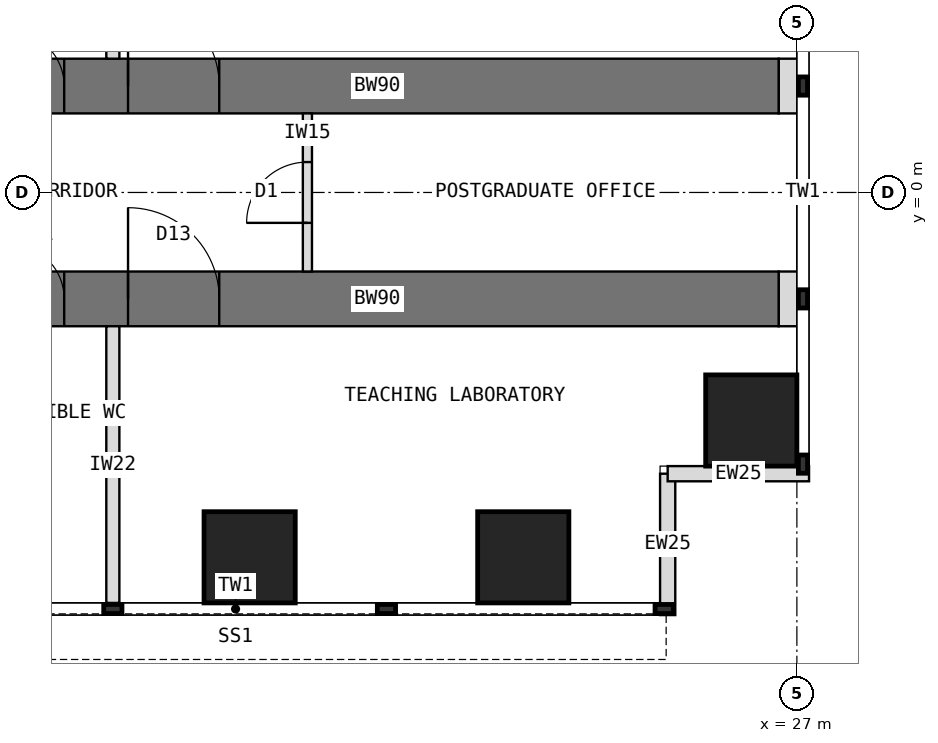
"""IFC4 building model, lengths in metres.
Left out: names, types, materials, properties, quantities, classifications, styles, units other than length and angle.
Written with IfcOpenShell. Run it as: python <this file> out.ifc"""

import sys

from ifc_helpers import new_model, si_unit, direction, frame, frame_2d, origin, origin_2d, place, context, subcontext, project, spatial, rectangle, extrude, element, fill, save


model = new_model("IFC4")
c1 = context("Model", 3, precision=1e-05, world=origin(), true_north=direction((0.0, 1.0)))
c2 = subcontext(c1, "Body", "Model", "MODEL_VIEW")
j1 = project(units=[si_unit("LENGTHUNIT", "METRE"), si_unit("PLANEANGLEUNIT", "RADIAN")], contexts=[c1])
p1 = place(None, origin())
s1 = spatial("IfcSite", under=j1, at=p1, CompositionType="ELEMENT")
p2 = place(p1, origin())
s2 = spatial("IfcBuilding", under=s1, at=p2, CompositionType="ELEMENT")
p3 = place(p2, frame((0.0, 0.0, 24.5)))
s3 = spatial("IfcBuildingStorey", under=s2, at=p3, CompositionType="ELEMENT", Elevation=24.5)
p4 = place(p3, frame((13.5, 1.75, 0.0), z_axis=(0.0, 0.0, 1.0), x_axis=(1.0, 0.0, 0.0)))
e1 = element("IfcWall", 1, at=p4, inside=s3, PredefinedType="SHEAR", context=c2, shape_type="SweptSolid", body=[
    extrude(rectangle(XDim=13.2, YDim=0.9, at=frame_2d((6.6, 0.0))), origin(), (0.0, 0.0, 1.0), 4.0),
])
p5 = place(p4, frame((0.55, 0.0, 0.0)))
e2 = element("IfcOpeningElement", 2, at=p5, cuts=e1, PredefinedType="OPENING", context=c2, shape_type="SweptSolid", body=[
    extrude(rectangle(XDim=0.9, YDim=2.1, at=frame_2d((0.45, 1.05))), frame((0.0, 0.46, 0.0), z_axis=(0.0, -1.0, 0.0), x_axis=(1.0, 0.0, 0.0)), (0.0, 0.0, 1.0), 0.92),
])
p6 = place(p4, frame((2.5, 0.0, 0.0)))
e3 = element("IfcOpeningElement", 3, at=p6, cuts=e1, PredefinedType="OPENING", context=c2, shape_type="SweptSolid", body=[
    extrude(rectangle(XDim=1.5, YDim=2.1, at=frame_2d((0.75, 1.05))), frame((0.0, 0.46, 0.0), z_axis=(0.0, -1.0, 0.0), x_axis=(1.0, 0.0, 0.0)), (0.0, 0.0, 1.0), 0.92),
])
p7 = place(p3, frame((13.5, -1.75, 0.0), z_axis=(0.0, 0.0, 1.0), x_axis=(1.0, 0.0, 0.0)))
e4 = element("IfcWall", 4, at=p7, inside=s3, PredefinedType="SHEAR", context=c2, shape_type="SweptSolid", body=[
    extrude(rectangle(XDim=13.2, YDim=0.9, at=frame_2d((6.6, 0.0))), origin(), (0.0, 0.0, 1.0), 4.0),
])
p8 = place(p7, frame((0.55, 0.0, 0.0)))
e5 = element("IfcOpeningElement", 5, at=p8, cuts=e4, PredefinedType="OPENING", context=c2, shape_type="SweptSolid", body=[
    extrude(rectangle(XDim=0.9, YDim=2.1, at=frame_2d((0.45, 1.05))), frame((0.0, 0.46, 0.0), z_axis=(0.0, -1.0, 0.0), x_axis=(1.0, 0.0, 0.0)), (0.0, 0.0, 1.0), 0.92),
])
p9 = place(p7, frame((2.5, 0.0, 0.0)))
e6 = element("IfcOpeningElement", 6, at=p9, cuts=e4, PredefinedType="OPENING", context=c2, shape_type="SweptSolid", body=[
    extrude(rectangle(XDim=1.5, YDim=2.1, at=frame_2d((0.75, 1.05))), frame((0.0, 0.46, 0.0), z_axis=(0.0, -1.0, 0.0), x_axis=(1.0, 0.0, 0.0)), (0.0, 0.0, 1.0), 0.92),
])
for number, where, z_axis, x_axis in (
    (7, (18.0, -6.0, 0.0), (0.0, 0.0, 1.0), (1.0, 0.0, 0.0)),
    (8, (22.5, -6.0, 0.0), (0.0, 0.0, 1.0), (1.0, 0.0, 0.0)),
    (9, (26.25, -3.75, 0.0), (0.0, 0.0, 1.0), (1.0, 0.0, 0.0)),
):
    element("IfcColumn", number, at=place(p3, frame(where, z_axis=z_axis, x_axis=x_axis)), inside=s3, PredefinedType="COLUMN", context=c2, shape_type="SweptSolid", body=[
        extrude(rectangle(XDim=1.5, YDim=1.5, at=origin_2d()), origin(), (0.0, 0.0, 1.0), 4.0),
    ])
for number, where, z_axis, x_axis in (
    (10, (24.875, -6.95, 0.0), (0.0, 0.0, 1.0), (0.0, 1.0, 0.0)),
    (11, (24.875, -4.625, 0.0), (0.0, 0.0, 1.0), (1.0, 0.0, 0.0)),
):
    element("IfcWall", number, at=place(p3, frame(where, z_axis=z_axis, x_axis=x_axis)), inside=s3, PredefinedType="STANDARD", context=c2, shape_type="SweptSolid", body=[
        extrude(rectangle(XDim=2.325, YDim=0.25, at=frame_2d((1.163, 0.0))), origin(), (0.0, 0.0, 1.0), 3.8),
    ])
for number, where, z_axis, x_axis in (
    (12, (26.7, 1.75, 0.0), (0.0, 0.0, 1.0), (1.0, 0.0, 0.0)),
    (13, (26.7, -1.75, 0.0), (0.0, 0.0, 1.0), (1.0, 0.0, 0.0)),
):
    element("IfcWall", number, at=place(p3, frame(where, z_axis=z_axis, x_axis=x_axis)), inside=s3, PredefinedType="PARTITIONING", context=c2, shape_type="SweptSolid", body=[
        extrude(rectangle(XDim=0.31, YDim=0.9, at=frame_2d((0.155, 0.0))), origin(), (0.0, 0.0, 1.0), 3.8),
    ])
for number, where, z_axis, x_axis in (
    (14, (15.75, 2.2, 0.0), (0.0, 0.0, 1.0), (0.0, 1.0, 0.0)),
    (15, (15.75, -2.2, 0.0), (0.0, 0.0, 1.0), (0.0, -1.0, 0.0)),
):
    element("IfcWall", number, at=place(p3, frame(where, z_axis=z_axis, x_axis=x_axis)), inside=s3, PredefinedType="PARTITIONING", context=c2, shape_type="SweptSolid", body=[
        extrude(rectangle(XDim=4.55, YDim=0.215, at=frame_2d((2.275, 0.0))), origin(), (0.0, 0.0, 1.0), 3.8),
    ])
p10 = place(p3, frame((18.95, -1.3, 0.0), z_axis=(0.0, 0.0, 1.0), x_axis=(0.0, 1.0, 0.0)))
e16 = element("IfcWall", 16, at=p10, inside=s3, PredefinedType="PARTITIONING", context=c2, shape_type="SweptSolid", body=[
    extrude(rectangle(XDim=2.6, YDim=0.15, at=frame_2d((1.3, 0.0))), origin(), (0.0, 0.0, 1.0), 3.8),
])
p11 = place(p10, frame((0.8, 0.0, 0.0)))
e17 = element("IfcOpeningElement", 17, at=p11, cuts=e16, PredefinedType="OPENING", context=c2, shape_type="SweptSolid", body=[
    extrude(rectangle(XDim=1.0, YDim=2.1, at=frame_2d((0.5, 1.05))), frame((0.0, 0.085, 0.0), z_axis=(0.0, -1.0, 0.0), x_axis=(1.0, 0.0, 0.0)), (0.0, 0.0, 1.0), 0.17),
])
p12 = place(p11, origin())
e18 = element("IfcDoor", 18, at=p12, inside=s3, OperationType="SINGLE_SWING_LEFT", PredefinedType="DOOR", context=c2, shape_type="SweptSolid", body=[
    extrude(rectangle(XDim=1.0, YDim=2.1, at=frame_2d((0.5, 1.05))), frame((0.0, 0.025, 0.0), z_axis=(0.0, -1.0, 0.0), x_axis=(1.0, 0.0, 0.0)), (0.0, 0.0, 1.0), 0.05),
])
fill(e17, e18)
p13 = place(p5, origin())
e19 = element("IfcDoor", 19, at=p13, inside=s3, OperationType="SINGLE_SWING_LEFT", PredefinedType="DOOR", context=c2, shape_type="SweptSolid", body=[
    extrude(rectangle(XDim=0.82, YDim=2.06, at=frame_2d((0.45, 1.03))), frame((0.0, 0.025, 0.0), z_axis=(0.0, -1.0, 0.0), x_axis=(1.0, 0.0, 0.0)), (0.0, 0.0, 1.0), 0.05),
    extrude(rectangle(XDim=0.04, YDim=2.1, at=frame_2d((0.02, 1.05))), frame((0.0, 0.45, 0.0), z_axis=(0.0, -1.0, 0.0), x_axis=(1.0, 0.0, 0.0)), (0.0, 0.0, 1.0), 0.899),
    extrude(rectangle(XDim=0.04, YDim=2.1, at=frame_2d((0.88, 1.05))), frame((0.0, 0.45, 0.0), z_axis=(0.0, -1.0, 0.0), x_axis=(1.0, 0.0, 0.0)), (0.0, 0.0, 1.0), 0.899),
    extrude(rectangle(XDim=0.82, YDim=0.04, at=frame_2d((0.45, 2.08))), frame((0.0, 0.45, 0.0), z_axis=(0.0, -1.0, 0.0), x_axis=(1.0, 0.0, 0.0)), (0.0, 0.0, 1.0), 0.899),
])
fill(e2, e19)
p14 = place(p6, origin())
e20 = element("IfcDoor", 20, at=p14, inside=s3, OperationType="DOUBLE_DOOR_SINGLE_SWING", PredefinedType="DOOR", context=c2, shape_type="SweptSolid", body=[
    extrude(rectangle(XDim=1.42, YDim=2.06, at=frame_2d((0.75, 1.03))), frame((0.0, 0.025, 0.0), z_axis=(0.0, -1.0, 0.0), x_axis=(1.0, 0.0, 0.0)), (0.0, 0.0, 1.0), 0.05),
    extrude(rectangle(XDim=0.04, YDim=2.1, at=frame_2d((0.02, 1.05))), frame((0.0, 0.45, 0.0), z_axis=(0.0, -1.0, 0.0), x_axis=(1.0, 0.0, 0.0)), (0.0, 0.0, 1.0), 0.899),
    extrude(rectangle(XDim=0.04, YDim=2.1, at=frame_2d((1.48, 1.05))), frame((0.0, 0.45, 0.0), z_axis=(0.0, -1.0, 0.0), x_axis=(1.0, 0.0, 0.0)), (0.0, 0.0, 1.0), 0.899),
    extrude(rectangle(XDim=1.42, YDim=0.04, at=frame_2d((0.75, 2.08))), frame((0.0, 0.45, 0.0), z_axis=(0.0, -1.0, 0.0), x_axis=(1.0, 0.0, 0.0)), (0.0, 0.0, 1.0), 0.899),
])
fill(e3, e20)
p15 = place(p8, origin())
e21 = element("IfcDoor", 21, at=p15, inside=s3, OperationType="SINGLE_SWING_LEFT", PredefinedType="DOOR", context=c2, shape_type="SweptSolid", body=[
    extrude(rectangle(XDim=0.82, YDim=2.06, at=frame_2d((0.45, 1.03))), frame((0.0, 0.025, 0.0), z_axis=(0.0, -1.0, 0.0), x_axis=(1.0, 0.0, 0.0)), (0.0, 0.0, 1.0), 0.05),
    extrude(rectangle(XDim=0.04, YDim=2.1, at=frame_2d((0.02, 1.05))), frame((0.0, 0.45, 0.0), z_axis=(0.0, -1.0, 0.0), x_axis=(1.0, 0.0, 0.0)), (0.0, 0.0, 1.0), 0.899),
    extrude(rectangle(XDim=0.04, YDim=2.1, at=frame_2d((0.88, 1.05))), frame((0.0, 0.45, 0.0), z_axis=(0.0, -1.0, 0.0), x_axis=(1.0, 0.0, 0.0)), (0.0, 0.0, 1.0), 0.899),
    extrude(rectangle(XDim=0.82, YDim=0.04, at=frame_2d((0.45, 2.08))), frame((0.0, 0.45, 0.0), z_axis=(0.0, -1.0, 0.0), x_axis=(1.0, 0.0, 0.0)), (0.0, 0.0, 1.0), 0.899),
])
fill(e5, e21)
p16 = place(p9, origin())
e22 = element("IfcDoor", 22, at=p16, inside=s3, OperationType="DOUBLE_DOOR_SINGLE_SWING", PredefinedType="DOOR", context=c2, shape_type="SweptSolid", body=[
    extrude(rectangle(XDim=1.42, YDim=2.06, at=frame_2d((0.75, 1.03))), frame((0.0, 0.025, 0.0), z_axis=(0.0, -1.0, 0.0), x_axis=(1.0, 0.0, 0.0)), (0.0, 0.0, 1.0), 0.05),
    extrude(rectangle(XDim=0.04, YDim=2.1, at=frame_2d((0.02, 1.05))), frame((0.0, 0.45, 0.0), z_axis=(0.0, -1.0, 0.0), x_axis=(1.0, 0.0, 0.0)), (0.0, 0.0, 1.0), 0.899),
    extrude(rectangle(XDim=0.04, YDim=2.1, at=frame_2d((1.48, 1.05))), frame((0.0, 0.45, 0.0), z_axis=(0.0, -1.0, 0.0), x_axis=(1.0, 0.0, 0.0)), (0.0, 0.0, 1.0), 0.899),
    extrude(rectangle(XDim=1.42, YDim=0.04, at=frame_2d((0.75, 2.08))), frame((0.0, 0.45, 0.0), z_axis=(0.0, -1.0, 0.0), x_axis=(1.0, 0.0, 0.0)), (0.0, 0.0, 1.0), 0.899),
])
fill(e6, e22)
save(model, sys.argv[1])
